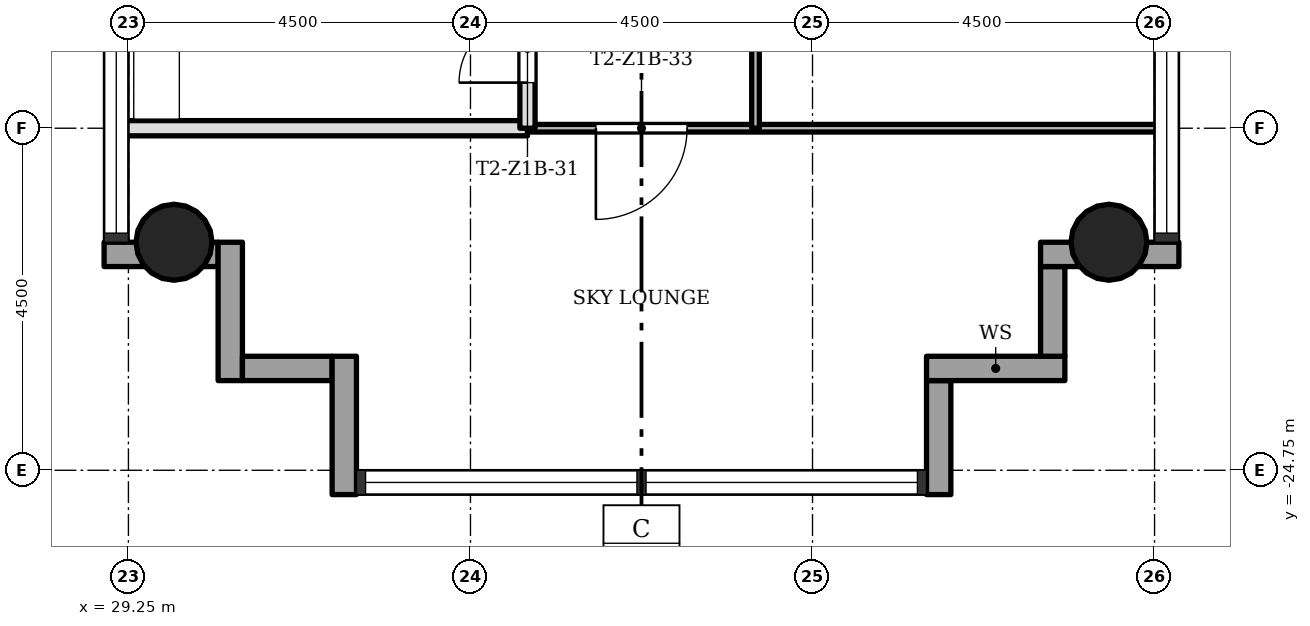
"""IFC4 building model, lengths in metres.
Left out: names, types, materials, properties, quantities, classifications, styles, units other than length and angle.
Written with IfcOpenShell. Run it as: python <this file> out.ifc"""

import sys

from ifc_helpers import new_model, si_unit, direction, frame, frame_2d, origin, origin_2d, place, context, subcontext, project, spatial, rectangle, hollow_circle, extrude, element, fill, save


model = new_model("IFC4")
c1 = context("Model", 3, precision=1e-05, world=origin(), true_north=direction((0.0, 1.0)))
c2 = subcontext(c1, "Body", "Model", "MODEL_VIEW")
j1 = project(units=[si_unit("LENGTHUNIT", "METRE"), si_unit("PLANEANGLEUNIT", "RADIAN")], contexts=[c1])
p1 = place(None, origin())
s1 = spatial("IfcSite", under=j1, at=p1, CompositionType="ELEMENT")
p2 = place(p1, origin())
s2 = spatial("IfcBuilding", under=s1, at=p2, CompositionType="ELEMENT")
p3 = place(p2, frame((0.0, 0.0, 34.7)))
s3 = spatial("IfcBuildingStorey", under=s2, at=p3, CompositionType="ELEMENT", Elevation=34.7)
for number, where, z_axis, x_axis in (
    (1, (42.15, -21.75, 0.0), (0.0, 0.0, 1.0), (1.0, 0.0, 0.0)),
    (2, (29.85, -21.75, 0.0), (0.0, 0.0, 1.0), (1.0, 0.0, 0.0)),
):
    element("IfcColumn", number, at=place(p3, frame(where, z_axis=z_axis, x_axis=x_axis)), inside=s3, PredefinedType="COLUMN", context=c2, shape_type="SweptSolid", body=[
        extrude(hollow_circle(Radius=0.5, WallThickness=0.036, at=origin_2d()), origin(), (0.0, 0.0, 1.0), 3.4),
    ])
p4 = place(p3, frame((39.91, -25.07, -0.3), z_axis=(0.0, 0.0, 1.0), x_axis=(0.0, 1.0, 0.0)))
e3 = element("IfcWall", 3, at=p4, inside=s3, PredefinedType="STANDARD", context=c2, shape_type="SweptSolid", body=[
    extrude(rectangle(XDim=1.5, YDim=0.32, at=frame_2d((0.75, 0.0))), origin(), (0.0, 0.0, 1.0), 3.4),
])
p5 = place(p3, frame((39.75, -23.41, -0.3), z_axis=(0.0, 0.0, 1.0), x_axis=(1.0, 0.0, 0.0)))
e4 = element("IfcWall", 4, at=p5, inside=s3, PredefinedType="STANDARD", context=c2, shape_type="SweptSolid", body=[
    extrude(rectangle(XDim=1.82, YDim=0.32, at=frame_2d((0.91, 0.0))), origin(), (0.0, 0.0, 1.0), 3.4),
])
p6 = place(p3, frame((41.41, -23.25, -0.3), z_axis=(0.0, 0.0, 1.0), x_axis=(0.0, 1.0, 0.0)))
e5 = element("IfcWall", 5, at=p6, inside=s3, PredefinedType="STANDARD", context=c2, shape_type="SweptSolid", body=[
    extrude(rectangle(XDim=1.18, YDim=0.32, at=frame_2d((0.59, 0.0))), origin(), (0.0, 0.0, 1.0), 3.4),
])
p7 = place(p3, frame((41.25, -21.91, -0.3), z_axis=(0.0, 0.0, 1.0), x_axis=(1.0, 0.0, 0.0)))
e6 = element("IfcWall", 6, at=p7, inside=s3, PredefinedType="STANDARD", context=c2, shape_type="SweptSolid", body=[
    extrude(rectangle(XDim=1.82, YDim=0.32, at=frame_2d((0.91, 0.0))), origin(), (0.0, 0.0, 1.0), 3.4),
])
p8 = place(p3, frame((28.93, -21.91, -0.3), z_axis=(0.0, 0.0, 1.0), x_axis=(1.0, 0.0, 0.0)))
e7 = element("IfcWall", 7, at=p8, inside=s3, PredefinedType="STANDARD", context=c2, shape_type="SweptSolid", body=[
    extrude(rectangle(XDim=1.5, YDim=0.32, at=frame_2d((0.75, 0.0))), origin(), (0.0, 0.0, 1.0), 3.4),
])
p9 = place(p3, frame((30.59, -21.75, -0.3), z_axis=(0.0, 0.0, 1.0), x_axis=(0.0, -1.0, 0.0)))
e8 = element("IfcWall", 8, at=p9, inside=s3, PredefinedType="STANDARD", context=c2, shape_type="SweptSolid", body=[
    extrude(rectangle(XDim=1.82, YDim=0.32, at=frame_2d((0.91, 0.0))), origin(), (0.0, 0.0, 1.0), 3.4),
])
p10 = place(p3, frame((30.75, -23.41, -0.3), z_axis=(0.0, 0.0, 1.0), x_axis=(1.0, 0.0, 0.0)))
e9 = element("IfcWall", 9, at=p10, inside=s3, PredefinedType="STANDARD", context=c2, shape_type="SweptSolid", body=[
    extrude(rectangle(XDim=1.18, YDim=0.32, at=frame_2d((0.59, 0.0))), origin(), (0.0, 0.0, 1.0), 3.4),
])
p11 = place(p3, frame((32.09, -23.25, -0.3), z_axis=(0.0, 0.0, 1.0), x_axis=(0.0, -1.0, 0.0)))
e10 = element("IfcWall", 10, at=p11, inside=s3, PredefinedType="STANDARD", context=c2, shape_type="SweptSolid", body=[
    extrude(rectangle(XDim=1.82, YDim=0.32, at=frame_2d((0.91, 0.0))), origin(), (0.0, 0.0, 1.0), 3.4),
])
p12 = place(p3, frame((42.85, -20.25, 0.0), z_axis=(0.0, 0.0, 1.0), x_axis=(-1.0, 0.0, 0.0)))
e11 = element("IfcWall", 11, at=p12, inside=s3, PredefinedType="PARTITIONING", context=c2, shape_type="SweptSolid", body=[
    extrude(rectangle(XDim=8.35, YDim=0.1, at=frame_2d((4.175, 0.0))), origin(), (0.0, 0.0, 1.0), 3.0),
])
p13 = place(p12, frame((6.25, 0.0, 0.0)))
e12 = element("IfcOpeningElement", 12, at=p13, cuts=e11, PredefinedType="OPENING", context=c2, shape_type="SweptSolid", body=[
    extrude(rectangle(XDim=1.2, YDim=2.1, at=frame_2d((0.6, 1.05))), frame((0.0, 0.06, 0.0), z_axis=(0.0, -1.0, 0.0), x_axis=(1.0, 0.0, 0.0)), (0.0, 0.0, 1.0), 0.12),
])
p14 = place(p3, frame((34.5, -20.25, 0.0), z_axis=(0.0, 0.0, 1.0), x_axis=(-1.0, 0.0, 0.0)))
e13 = element("IfcWall", 13, at=p14, inside=s3, PredefinedType="SOLIDWALL", context=c2, shape_type="SweptSolid", body=[
    extrude(rectangle(XDim=5.35, YDim=0.2, at=frame_2d((2.675, 0.0))), origin(), (0.0, 0.0, 1.0), 3.0),
])
p15 = place(p3, frame((37.5, -20.25, 0.0), z_axis=(0.0, 0.0, 1.0), x_axis=(0.0, 1.0, 0.0)))
e14 = element("IfcWall", 14, at=p15, inside=s3, PredefinedType="PARTITIONING", context=c2, shape_type="SweptSolid", body=[
    extrude(rectangle(XDim=4.5, YDim=0.1, at=frame_2d((2.25, 0.0))), origin(), (0.0, 0.0, 1.0), 3.0),
])
p16 = place(p15, frame((1.8, 0.0, 0.0)))
e15 = element("IfcOpeningElement", 15, at=p16, cuts=e14, PredefinedType="OPENING", context=c2, shape_type="SweptSolid", body=[
    extrude(rectangle(XDim=0.9, YDim=2.1, at=frame_2d((0.45, 1.05))), frame((0.0, 0.06, 0.0), z_axis=(0.0, -1.0, 0.0), x_axis=(1.0, 0.0, 0.0)), (0.0, 0.0, 1.0), 0.12),
])
p17 = place(p3, frame((34.5, -20.25, 0.0), z_axis=(0.0, 0.0, 1.0), x_axis=(0.0, 1.0, 0.0)))
e16 = element("IfcWall", 16, at=p17, inside=s3, PredefinedType="SOLIDWALL", context=c2, shape_type="SweptSolid", body=[
    extrude(rectangle(XDim=4.5, YDim=0.2, at=frame_2d((2.25, 0.0))), origin(), (0.0, 0.0, 1.0), 3.0),
])
p18 = place(p17, frame((0.6, 0.0, 0.0)))
e17 = element("IfcOpeningElement", 17, at=p18, cuts=e16, PredefinedType="OPENING", context=c2, shape_type="SweptSolid", body=[
    extrude(rectangle(XDim=0.9, YDim=2.1, at=frame_2d((0.45, 1.05))), frame((0.0, 0.11, 0.0), z_axis=(0.0, -1.0, 0.0), x_axis=(1.0, 0.0, 0.0)), (0.0, 0.0, 1.0), 0.22),
])
p19 = place(p18, origin())
e18 = element("IfcDoor", 18, at=p19, inside=s3, OperationType="SINGLE_SWING_RIGHT", PredefinedType="DOOR", context=c2, shape_type="SweptSolid", body=[
    extrude(rectangle(XDim=0.9, YDim=2.1, at=frame_2d((0.45, 1.05))), frame((0.0, 0.025, 0.0), z_axis=(0.0, -1.0, 0.0), x_axis=(1.0, 0.0, 0.0)), (0.0, 0.0, 1.0), 0.05),
])
fill(e17, e18)
p20 = place(p13, origin())
e19 = element("IfcDoor", 19, at=p20, inside=s3, OperationType="SINGLE_SWING_LEFT", PredefinedType="DOOR", context=c2, shape_type="SweptSolid", body=[
    extrude(rectangle(XDim=1.2, YDim=2.1, at=frame_2d((0.6, 1.05))), frame((0.0, 0.025, 0.0), z_axis=(0.0, -1.0, 0.0), x_axis=(1.0, 0.0, 0.0)), (0.0, 0.0, 1.0), 0.05),
])
fill(e12, e19)
save(model, sys.argv[1])
